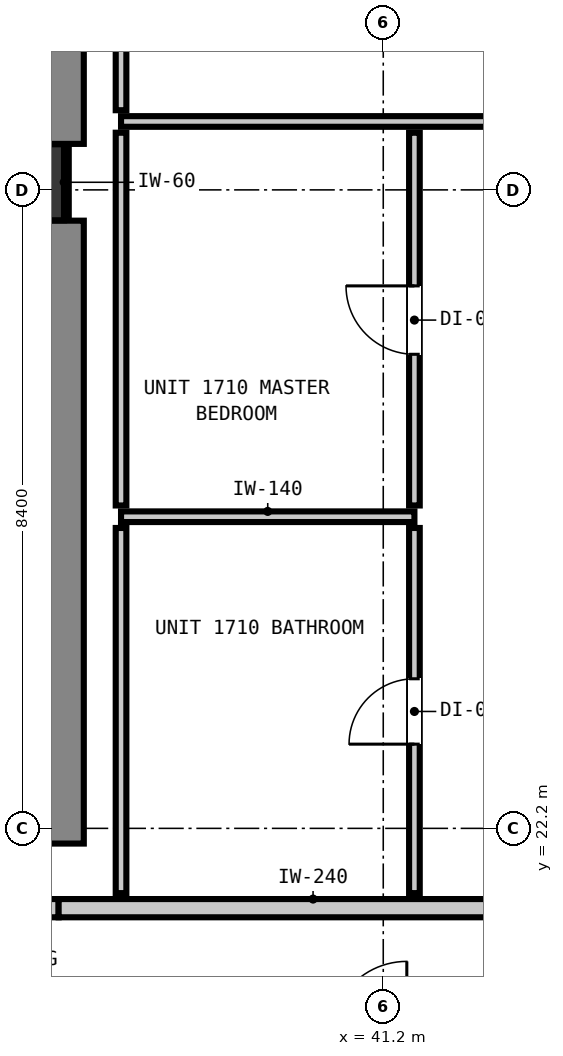
"""IFC4 building model, lengths in metres.
Left out: names, types, materials, properties, quantities, classifications, styles, units other than length and angle.
Written with IfcOpenShell. Run it as: python <this file> out.ifc"""

import sys

from ifc_helpers import new_model, si_unit, direction, frame, frame_2d, origin, origin_2d, place, context, subcontext, project, spatial, rectangle, extrude, element, fill, save


model = new_model("IFC4")
c1 = context("Model", 3, precision=1e-05, world=origin(), true_north=direction((0.0, 1.0)))
c2 = subcontext(c1, "Body", "Model", "MODEL_VIEW")
j1 = project(units=[si_unit("LENGTHUNIT", "METRE"), si_unit("PLANEANGLEUNIT", "RADIAN")], contexts=[c1])
p1 = place(None, origin())
s1 = spatial("IfcSite", under=j1, at=p1, CompositionType="ELEMENT")
p2 = place(p1, origin())
s2 = spatial("IfcBuilding", under=s1, at=p2, CompositionType="ELEMENT")
p3 = place(p2, frame((0.0, 0.0, 61.84)))
s3 = spatial("IfcBuildingStorey", under=s2, at=p3, CompositionType="ELEMENT", Elevation=61.84)
p4 = place(p3, frame((36.5, 30.7, 0.0), z_axis=(0.0, 0.0, 1.0), x_axis=(1.0, 0.0, 0.0)))
e1 = element("IfcColumn", 1, at=p4, inside=s3, PredefinedType="COLUMN", context=c2, shape_type="SweptSolid", body=[
    extrude(rectangle(XDim=1.0, YDim=1.0, at=origin_2d()), origin(), (0.0, 0.0, 1.0), 3.32),
])
p5 = place(p3, frame((36.66, 22.0, 0.0), z_axis=(0.0, 0.0, 1.0), x_axis=(0.0, 1.0, 0.0)))
e2 = element("IfcWall", 2, at=p5, inside=s3, PredefinedType="SHEAR", context=c2, shape_type="SweptSolid", body=[
    extrude(rectangle(XDim=8.195, YDim=1.2, at=frame_2d((4.098, 0.0))), origin(), (0.0, 0.0, 1.0), 3.32),
])
p6 = place(p3, frame((36.66, 31.205, 0.0), z_axis=(0.0, 0.0, 1.0), x_axis=(0.0, 1.0, 0.0)))
e3 = element("IfcWall", 3, at=p6, inside=s3, PredefinedType="SHEAR", context=c2, shape_type="SweptSolid", body=[
    extrude(rectangle(XDim=8.195, YDim=1.2, at=frame_2d((4.097, 0.0))), origin(), (0.0, 0.0, 1.0), 3.32),
])
p7 = place(p3, frame((10.15, 21.15, 0.0), z_axis=(0.0, 0.0, 1.0), x_axis=(1.0, 0.0, 0.0)))
e4 = element("IfcWall", 4, at=p7, inside=s3, PredefinedType="PARTITIONING", context=c2, shape_type="SweptSolid", body=[
    extrude(rectangle(XDim=26.779, YDim=0.24, at=frame_2d((13.39, 0.0))), origin(), (0.0, 0.0, 1.0), 3.06),
])
p8 = place(p7, frame((8.06, 0.0, 0.0)))
e5 = element("IfcOpeningElement", 5, at=p8, cuts=e4, PredefinedType="OPENING", context=c2, shape_type="SweptSolid", body=[
    extrude(rectangle(XDim=1.1, YDim=2.15, at=frame_2d((0.55, 1.075))), frame((0.0, 0.13, 0.0), z_axis=(0.0, -1.0, 0.0), x_axis=(1.0, 0.0, 0.0)), (0.0, 0.0, 1.0), 0.26),
])
p9 = place(p7, frame((0.324, 0.0, 0.0)))
e6 = element("IfcOpeningElement", 6, at=p9, cuts=e4, PredefinedType="OPENING", context=c2, shape_type="SweptSolid", body=[
    extrude(rectangle(XDim=1.4, YDim=2.15, at=frame_2d((0.7, 1.075))), frame((0.0, 0.13, 0.0), z_axis=(0.0, -1.0, 0.0), x_axis=(1.0, 0.0, 0.0)), (0.0, 0.0, 1.0), 0.26),
])
p10 = place(p3, frame((36.929, 21.15, 0.0), z_axis=(0.0, 0.0, 1.0), x_axis=(1.0, 0.0, 0.0)))
e7 = element("IfcWall", 7, at=p10, inside=s3, PredefinedType="PARTITIONING", context=c2, shape_type="SweptSolid", body=[
    extrude(rectangle(XDim=12.392, YDim=0.24, at=frame_2d((6.196, 0.0))), origin(), (0.0, 0.0, 1.0), 2.445),
])
p11 = place(p10, frame((6.795, 0.0, 0.0)))
e8 = element("IfcOpeningElement", 8, at=p11, cuts=e7, PredefinedType="OPENING", context=c2, shape_type="SweptSolid", body=[
    extrude(rectangle(XDim=1.0, YDim=2.15, at=frame_2d((0.5, 1.075))), frame((0.0, 0.13, 0.0), z_axis=(0.0, -1.0, 0.0), x_axis=(1.0, 0.0, 0.0)), (0.0, 0.0, 1.0), 0.26),
])
p12 = place(p3, frame((37.75, 26.3, 0.0), z_axis=(0.0, 0.0, 1.0), x_axis=(1.0, 0.0, 0.0)))
e9 = element("IfcWall", 9, at=p12, inside=s3, PredefinedType="PARTITIONING", context=c2, shape_type="SweptSolid", body=[
    extrude(rectangle(XDim=3.86, YDim=0.14, at=frame_2d((1.93, 0.0))), origin(), (0.0, 0.0, 1.0), 3.06),
])
p13 = place(p3, frame((37.75, 31.5, 0.0), z_axis=(0.0, 0.0, 1.0), x_axis=(1.0, 0.0, 0.0)))
e10 = element("IfcWall", 10, at=p13, inside=s3, PredefinedType="PARTITIONING", context=c2, shape_type="SweptSolid", body=[
    extrude(rectangle(XDim=12.423, YDim=0.14, at=frame_2d((6.211, 0.0))), origin(), (0.0, 0.0, 1.0), 3.06),
])
p14 = place(p3, frame((37.75, 21.348, 0.0), z_axis=(0.0, 0.0, 1.0), x_axis=(0.0, 1.0, 0.0)))
e11 = element("IfcWall", 11, at=p14, inside=s3, PredefinedType="PARTITIONING", context=c2, shape_type="SweptSolid", body=[
    extrude(rectangle(XDim=4.804, YDim=0.14, at=frame_2d((2.402, 0.0))), origin(), (0.0, 0.0, 1.0), 3.06),
])
p15 = place(p3, frame((37.75, 26.448, 0.0), z_axis=(0.0, 0.0, 1.0), x_axis=(0.0, 1.0, 0.0)))
e12 = element("IfcWall", 12, at=p15, inside=s3, PredefinedType="PARTITIONING", context=c2, shape_type="SweptSolid", body=[
    extrude(rectangle(XDim=4.904, YDim=0.14, at=frame_2d((2.452, 0.0))), origin(), (0.0, 0.0, 1.0), 3.06),
])
p16 = place(p3, frame((37.75, 31.648, 0.0), z_axis=(0.0, 0.0, 1.0), x_axis=(0.0, 1.0, 0.0)))
e13 = element("IfcWall", 13, at=p16, inside=s3, PredefinedType="PARTITIONING", context=c2, shape_type="SweptSolid", body=[
    extrude(rectangle(XDim=8.434, YDim=0.14, at=frame_2d((4.217, 0.0))), origin(), (0.0, 0.0, 1.0), 3.06),
])
p17 = place(p3, frame((41.61, 21.348, 0.0), z_axis=(0.0, 0.0, 1.0), x_axis=(0.0, 1.0, 0.0)))
e14 = element("IfcWall", 14, at=p17, inside=s3, PredefinedType="PARTITIONING", context=c2, shape_type="SweptSolid", body=[
    extrude(rectangle(XDim=4.804, YDim=0.14, at=frame_2d((2.402, 0.0))), origin(), (0.0, 0.0, 1.0), 3.06),
])
p18 = place(p17, frame((1.96, 0.0, 0.0)))
e15 = element("IfcOpeningElement", 15, at=p18, cuts=e14, PredefinedType="OPENING", context=c2, shape_type="SweptSolid", body=[
    extrude(rectangle(XDim=0.86, YDim=2.02, at=frame_2d((0.43, 1.01))), frame((0.0, 0.08, 0.0), z_axis=(0.0, -1.0, 0.0), x_axis=(1.0, 0.0, 0.0)), (0.0, 0.0, 1.0), 0.16),
])
p19 = place(p3, frame((41.61, 26.448, 0.0), z_axis=(0.0, 0.0, 1.0), x_axis=(0.0, 1.0, 0.0)))
e16 = element("IfcWall", 16, at=p19, inside=s3, PredefinedType="PARTITIONING", context=c2, shape_type="SweptSolid", body=[
    extrude(rectangle(XDim=4.904, YDim=0.14, at=frame_2d((2.452, 0.0))), origin(), (0.0, 0.0, 1.0), 3.06),
])
p20 = place(p19, frame((1.989, 0.0, 0.0)))
e17 = element("IfcOpeningElement", 17, at=p20, cuts=e16, PredefinedType="OPENING", context=c2, shape_type="SweptSolid", body=[
    extrude(rectangle(XDim=0.9, YDim=2.1, at=frame_2d((0.45, 1.05))), frame((0.0, 0.08, 0.0), z_axis=(0.0, -1.0, 0.0), x_axis=(1.0, 0.0, 0.0)), (0.0, 0.0, 1.0), 0.16),
])
p21 = place(p3, frame((37.032, 30.21, 0.0), z_axis=(0.0, 0.0, 1.0), x_axis=(0.0, 1.0, 0.0)))
e18 = element("IfcWall", 18, at=p21, inside=s3, PredefinedType="PARTITIONING", context=c2, shape_type="SweptSolid", body=[
    extrude(rectangle(XDim=0.98, YDim=0.06, at=frame_2d((0.49, 0.0))), origin(), (0.0, 0.0, 1.0), 1.45),
])
p22 = place(p18, origin())
e19 = element("IfcDoor", 19, at=p22, inside=s3, OperationType="SINGLE_SWING_LEFT", PredefinedType="DOOR", context=c2, shape_type="SweptSolid", body=[
    extrude(rectangle(XDim=0.86, YDim=2.02, at=frame_2d((0.43, 1.01))), frame((0.0, 0.025, 0.0), z_axis=(0.0, -1.0, 0.0), x_axis=(1.0, 0.0, 0.0)), (0.0, 0.0, 1.0), 0.05),
])
fill(e15, e19)
p23 = place(p20, origin())
e20 = element("IfcDoor", 20, at=p23, inside=s3, OperationType="SINGLE_SWING_RIGHT", PredefinedType="DOOR", context=c2, shape_type="SweptSolid", body=[
    extrude(rectangle(XDim=0.9, YDim=2.1, at=frame_2d((0.45, 1.05))), frame((0.0, 0.025, 0.0), z_axis=(0.0, -1.0, 0.0), x_axis=(1.0, 0.0, 0.0)), (0.0, 0.0, 1.0), 0.05),
])
fill(e17, e20)
save(model, sys.argv[1])
